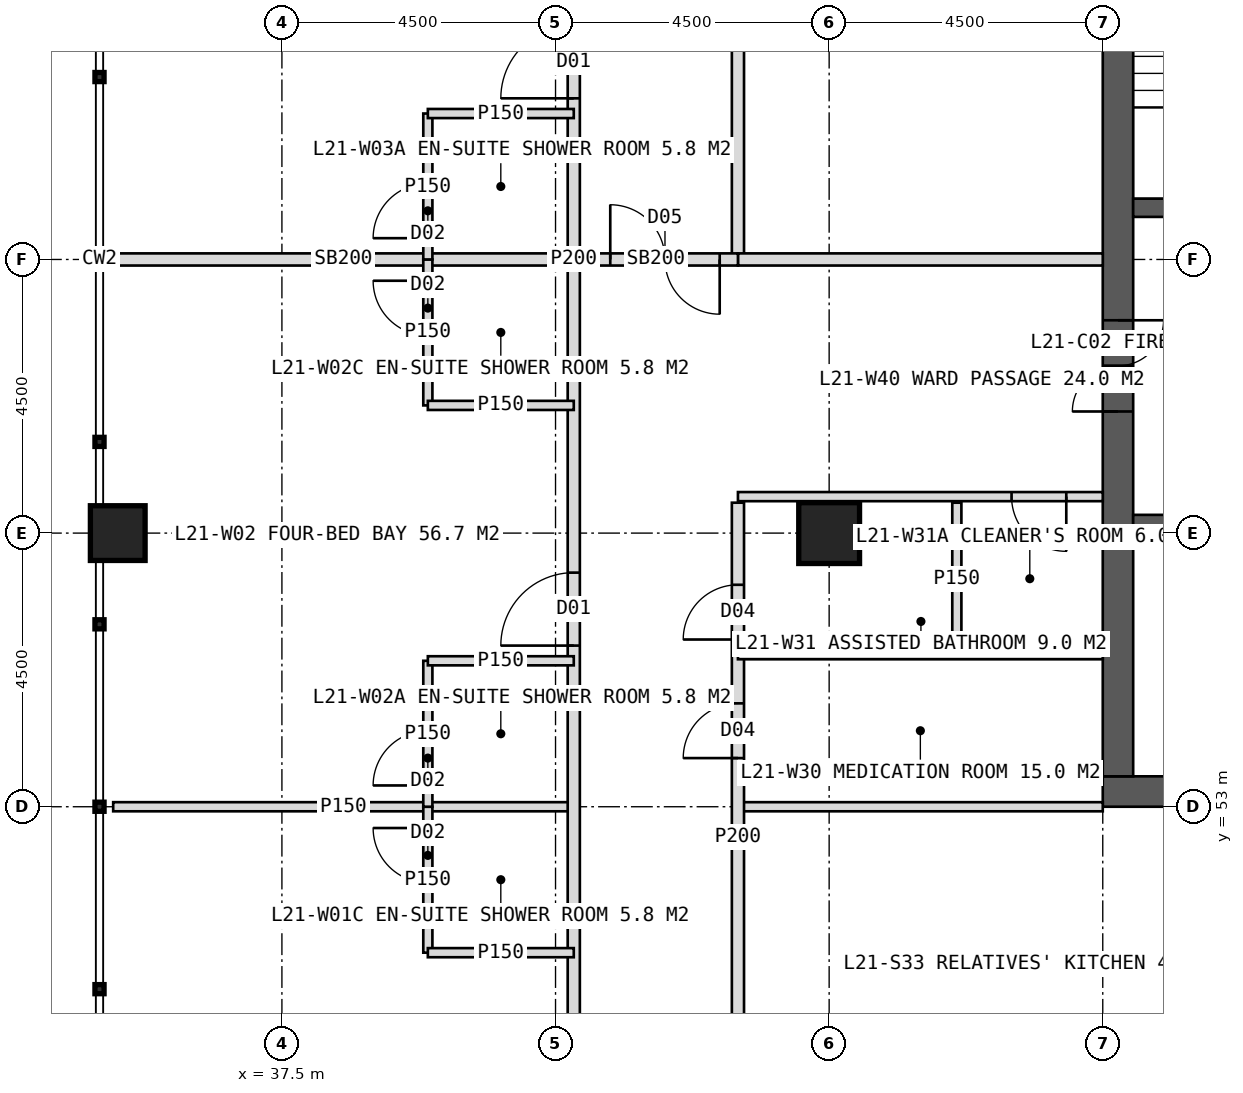
"""IFC4 building model, lengths in metres.
Left out: names, types, materials, properties, quantities, classifications, styles, units other than length and angle.
Written with IfcOpenShell. Run it as: python <this file> out.ifc"""

import sys

from ifc_helpers import new_model, si_unit, direction, frame, frame_2d, origin, origin_2d, place, context, subcontext, project, spatial, rectangle, hollow_rectangle, extrude, element, fill, save


model = new_model("IFC4")
c1 = context("Model", 3, precision=1e-05, world=origin(), true_north=direction((0.0, 1.0)))
c2 = subcontext(c1, "Body", "Model", "MODEL_VIEW")
j1 = project(units=[si_unit("LENGTHUNIT", "METRE"), si_unit("PLANEANGLEUNIT", "RADIAN")], contexts=[c1])
p1 = place(None, origin())
s1 = spatial("IfcSite", under=j1, at=p1, CompositionType="ELEMENT")
p2 = place(p1, origin())
s2 = spatial("IfcBuilding", under=s1, at=p2, CompositionType="ELEMENT")
p3 = place(p2, frame((0.0, 0.0, 91.0)))
s3 = spatial("IfcBuildingStorey", under=s2, at=p3, CompositionType="ELEMENT", Elevation=91.0)
p4 = place(p3, frame((51.0, 53.25, 0.0), z_axis=(0.0, 0.0, 1.0), x_axis=(1.0, 0.0, 0.0)))
e1 = element("IfcWall", 1, at=p4, inside=s3, PredefinedType="SHEAR", context=c2, shape_type="SweptSolid", body=[
    extrude(rectangle(XDim=18.0, YDim=0.5, at=frame_2d((9.0, 0.0))), origin(), (0.0, 0.0, 1.0), 4.0),
])
p5 = place(p4, frame((8.1, 0.0, 0.0)))
e2 = element("IfcOpeningElement", 2, at=p5, cuts=e1, PredefinedType="OPENING", context=c2, shape_type="SweptSolid", body=[
    extrude(rectangle(XDim=1.8, YDim=2.2, at=frame_2d((0.9, 1.1))), frame((0.0, 0.26, 0.0), z_axis=(0.0, -1.0, 0.0), x_axis=(1.0, 0.0, 0.0)), (0.0, 0.0, 1.0), 0.52),
])
p6 = place(p3, frame((51.25, 53.5, 0.0), z_axis=(0.0, 0.0, 1.0), x_axis=(0.0, 1.0, 0.0)))
e3 = element("IfcWall", 3, at=p6, inside=s3, PredefinedType="SHEAR", context=c2, shape_type="SweptSolid", body=[
    extrude(rectangle(XDim=17.0, YDim=0.5, at=frame_2d((8.5, 0.0))), origin(), (0.0, 0.0, 1.0), 4.0),
])
p7 = place(p6, frame((6.0, 0.0, 0.0)))
e4 = element("IfcOpeningElement", 4, at=p7, cuts=e3, PredefinedType="OPENING", context=c2, shape_type="SweptSolid", body=[
    extrude(rectangle(XDim=1.5, YDim=2.2, at=frame_2d((0.75, 1.1))), frame((0.0, 0.26, 0.0), z_axis=(0.0, -1.0, 0.0), x_axis=(1.0, 0.0, 0.0)), (0.0, 0.0, 1.0), 0.52),
])
p8 = place(p3, frame((51.5, 62.85, 0.0), z_axis=(0.0, 0.0, 1.0), x_axis=(1.0, 0.0, 0.0)))
e5 = element("IfcWall", 5, at=p8, inside=s3, PredefinedType="SHEAR", context=c2, shape_type="SweptSolid", body=[
    extrude(rectangle(XDim=3.3, YDim=0.3, at=frame_2d((1.65, 0.0))), origin(), (0.0, 0.0, 1.0), 4.0),
])
p9 = place(p8, frame((1.05, 0.0, 0.0)))
e6 = element("IfcOpeningElement", 6, at=p9, cuts=e5, PredefinedType="OPENING", context=c2, shape_type="SweptSolid", body=[
    extrude(rectangle(XDim=1.2, YDim=2.1, at=frame_2d((0.6, 1.05))), frame((0.0, 0.16, 0.0), z_axis=(0.0, -1.0, 0.0), x_axis=(1.0, 0.0, 0.0)), (0.0, 0.0, 1.0), 0.32),
])
p10 = place(p3, frame((51.5, 57.65, 0.0), z_axis=(0.0, 0.0, 1.0), x_axis=(1.0, 0.0, 0.0)))
e7 = element("IfcWall", 7, at=p10, inside=s3, PredefinedType="SHEAR", context=c2, shape_type="SweptSolid", body=[
    extrude(rectangle(XDim=3.3, YDim=0.3, at=frame_2d((1.65, 0.0))), origin(), (0.0, 0.0, 1.0), 4.0),
])
p11 = place(p10, frame((1.05, 0.0, 0.0)))
e8 = element("IfcOpeningElement", 8, at=p11, cuts=e7, PredefinedType="OPENING", context=c2, shape_type="SweptSolid", body=[
    extrude(rectangle(XDim=1.2, YDim=2.2, at=frame_2d((0.6, 1.1))), frame((0.0, 0.16, 0.0), z_axis=(0.0, -1.0, 0.0), x_axis=(1.0, 0.0, 0.0)), (0.0, 0.0, 1.0), 0.32),
])
p12 = place(p3, frame((46.5, 57.5, 0.0), z_axis=(0.0, 0.0, 1.0), x_axis=(1.0, 0.0, 0.0)))
e9 = element("IfcColumn", 9, at=p12, inside=s3, PredefinedType="COLUMN", context=c2, shape_type="SweptSolid", body=[
    extrude(hollow_rectangle(XDim=1.0, YDim=1.0, WallThickness=0.1, at=origin_2d()), origin(), (0.0, 0.0, 1.0), 4.0),
])
p13 = place(p3, frame((34.8, 57.5, 0.0), z_axis=(0.0, 0.0, 1.0), x_axis=(1.0, 0.0, 0.0)))
e10 = element("IfcColumn", 10, at=p13, inside=s3, PredefinedType="COLUMN", context=c2, shape_type="SweptSolid", body=[
    extrude(hollow_rectangle(XDim=0.9, YDim=0.9, WallThickness=0.08, at=origin_2d()), origin(), (0.0, 0.0, 1.0), 4.0),
])
p14 = place(p3, frame((42.3, 53.0, 0.0), z_axis=(0.0, 0.0, 1.0), x_axis=(-1.0, 0.0, 0.0)))
e11 = element("IfcWall", 11, at=p14, inside=s3, PredefinedType="PARTITIONING", context=c2, shape_type="SweptSolid", body=[
    extrude(rectangle(XDim=7.575, YDim=0.15, at=frame_2d((3.788, 0.0))), origin(), (0.0, 0.0, 1.0), 3.75),
])
p15 = place(p3, frame((42.3, 62.0, 0.0), z_axis=(0.0, 0.0, 1.0), x_axis=(-1.0, 0.0, 0.0)))
e12 = element("IfcWall", 12, at=p15, inside=s3, PredefinedType="SOLIDWALL", context=c2, shape_type="SweptSolid", body=[
    extrude(rectangle(XDim=7.575, YDim=0.2, at=frame_2d((3.788, 0.0))), origin(), (0.0, 0.0, 1.0), 2.75),
])
p16 = place(p3, frame((42.3, 44.3, 0.0), z_axis=(0.0, 0.0, 1.0), x_axis=(0.0, 1.0, 0.0)))
e13 = element("IfcWall", 13, at=p16, inside=s3, PredefinedType="PARTITIONING", context=c2, shape_type="SweptSolid", body=[
    extrude(rectangle(XDim=35.4, YDim=0.2, at=frame_2d((17.7, 0.0))), origin(), (0.0, 0.0, 1.0), 3.75),
])
p17 = place(p16, frame((2.65, 0.0, 0.0)))
e14 = element("IfcOpeningElement", 14, at=p17, cuts=e13, PredefinedType="OPENING", context=c2, shape_type="SweptSolid", body=[
    extrude(rectangle(XDim=1.2, YDim=2.2, at=frame_2d((0.6, 1.1))), frame((0.0, 0.11, 0.0), z_axis=(0.0, -1.0, 0.0), x_axis=(1.0, 0.0, 0.0)), (0.0, 0.0, 1.0), 0.22),
])
p18 = place(p16, frame((11.35, 0.0, 0.0)))
e15 = element("IfcOpeningElement", 15, at=p18, cuts=e13, PredefinedType="OPENING", context=c2, shape_type="SweptSolid", body=[
    extrude(rectangle(XDim=1.2, YDim=2.2, at=frame_2d((0.6, 1.1))), frame((0.0, 0.11, 0.0), z_axis=(0.0, -1.0, 0.0), x_axis=(1.0, 0.0, 0.0)), (0.0, 0.0, 1.0), 0.22),
])
p19 = place(p16, frame((20.35, 0.0, 0.0)))
e16 = element("IfcOpeningElement", 16, at=p19, cuts=e13, PredefinedType="OPENING", context=c2, shape_type="SweptSolid", body=[
    extrude(rectangle(XDim=1.2, YDim=2.2, at=frame_2d((0.6, 1.1))), frame((0.0, 0.11, 0.0), z_axis=(0.0, -1.0, 0.0), x_axis=(1.0, 0.0, 0.0)), (0.0, 0.0, 1.0), 0.22),
])
p20 = place(p16, frame((26.35, 0.0, 0.0)))
e17 = element("IfcOpeningElement", 17, at=p20, cuts=e13, PredefinedType="OPENING", context=c2, shape_type="SweptSolid", body=[
    extrude(rectangle(XDim=1.2, YDim=2.2, at=frame_2d((0.6, 1.1))), frame((0.0, 0.11, 0.0), z_axis=(0.0, -1.0, 0.0), x_axis=(1.0, 0.0, 0.0)), (0.0, 0.0, 1.0), 0.22),
])
p21 = place(p16, frame((30.85, 0.0, 0.0)))
e18 = element("IfcOpeningElement", 18, at=p21, cuts=e13, PredefinedType="OPENING", context=c2, shape_type="SweptSolid", body=[
    extrude(rectangle(XDim=1.2, YDim=2.2, at=frame_2d((0.6, 1.1))), frame((0.0, 0.11, 0.0), z_axis=(0.0, -1.0, 0.0), x_axis=(1.0, 0.0, 0.0)), (0.0, 0.0, 1.0), 0.22),
])
p22 = place(p3, frame((39.9, 50.6, 0.0), z_axis=(0.0, 0.0, 1.0), x_axis=(0.0, 1.0, 0.0)))
e19 = element("IfcWall", 19, at=p22, inside=s3, PredefinedType="PARTITIONING", context=c2, shape_type="SweptSolid", body=[
    extrude(rectangle(XDim=2.4, YDim=0.15, at=frame_2d((1.2, 0.0))), origin(), (0.0, 0.0, 1.0), 3.75),
])
p23 = place(p22, frame((1.15, 0.0, 0.0)))
e20 = element("IfcOpeningElement", 20, at=p23, cuts=e19, PredefinedType="OPENING", context=c2, shape_type="SweptSolid", body=[
    extrude(rectangle(XDim=0.9, YDim=2.1, at=frame_2d((0.45, 1.05))), frame((0.0, 0.085, 0.0), z_axis=(0.0, -1.0, 0.0), x_axis=(1.0, 0.0, 0.0)), (0.0, 0.0, 1.0), 0.17),
])
p24 = place(p3, frame((42.3, 50.6, 0.0), z_axis=(0.0, 0.0, 1.0), x_axis=(-1.0, 0.0, 0.0)))
e21 = element("IfcWall", 21, at=p24, inside=s3, PredefinedType="PARTITIONING", context=c2, shape_type="SweptSolid", body=[
    extrude(rectangle(XDim=2.4, YDim=0.15, at=frame_2d((1.2, 0.0))), origin(), (0.0, 0.0, 1.0), 3.75),
])
p25 = place(p3, frame((39.9, 53.0, 0.0), z_axis=(0.0, 0.0, 1.0), x_axis=(0.0, 1.0, 0.0)))
e22 = element("IfcWall", 22, at=p25, inside=s3, PredefinedType="PARTITIONING", context=c2, shape_type="SweptSolid", body=[
    extrude(rectangle(XDim=2.4, YDim=0.15, at=frame_2d((1.2, 0.0))), origin(), (0.0, 0.0, 1.0), 3.75),
])
p26 = place(p25, frame((0.35, 0.0, 0.0)))
e23 = element("IfcOpeningElement", 23, at=p26, cuts=e22, PredefinedType="OPENING", context=c2, shape_type="SweptSolid", body=[
    extrude(rectangle(XDim=0.9, YDim=2.1, at=frame_2d((0.45, 1.05))), frame((0.0, 0.085, 0.0), z_axis=(0.0, -1.0, 0.0), x_axis=(1.0, 0.0, 0.0)), (0.0, 0.0, 1.0), 0.17),
])
p27 = place(p3, frame((42.3, 55.4, 0.0), z_axis=(0.0, 0.0, 1.0), x_axis=(-1.0, 0.0, 0.0)))
e24 = element("IfcWall", 24, at=p27, inside=s3, PredefinedType="PARTITIONING", context=c2, shape_type="SweptSolid", body=[
    extrude(rectangle(XDim=2.4, YDim=0.15, at=frame_2d((1.2, 0.0))), origin(), (0.0, 0.0, 1.0), 3.75),
])
p28 = place(p3, frame((39.9, 59.6, 0.0), z_axis=(0.0, 0.0, 1.0), x_axis=(0.0, 1.0, 0.0)))
e25 = element("IfcWall", 25, at=p28, inside=s3, PredefinedType="PARTITIONING", context=c2, shape_type="SweptSolid", body=[
    extrude(rectangle(XDim=2.4, YDim=0.15, at=frame_2d((1.2, 0.0))), origin(), (0.0, 0.0, 1.0), 3.75),
])
p29 = place(p28, frame((1.15, 0.0, 0.0)))
e26 = element("IfcOpeningElement", 26, at=p29, cuts=e25, PredefinedType="OPENING", context=c2, shape_type="SweptSolid", body=[
    extrude(rectangle(XDim=0.9, YDim=2.1, at=frame_2d((0.45, 1.05))), frame((0.0, 0.085, 0.0), z_axis=(0.0, -1.0, 0.0), x_axis=(1.0, 0.0, 0.0)), (0.0, 0.0, 1.0), 0.17),
])
p30 = place(p3, frame((42.3, 59.6, 0.0), z_axis=(0.0, 0.0, 1.0), x_axis=(-1.0, 0.0, 0.0)))
e27 = element("IfcWall", 27, at=p30, inside=s3, PredefinedType="PARTITIONING", context=c2, shape_type="SweptSolid", body=[
    extrude(rectangle(XDim=2.4, YDim=0.15, at=frame_2d((1.2, 0.0))), origin(), (0.0, 0.0, 1.0), 3.75),
])
p31 = place(p3, frame((39.9, 62.0, 0.0), z_axis=(0.0, 0.0, 1.0), x_axis=(0.0, 1.0, 0.0)))
e28 = element("IfcWall", 28, at=p31, inside=s3, PredefinedType="PARTITIONING", context=c2, shape_type="SweptSolid", body=[
    extrude(rectangle(XDim=2.4, YDim=0.15, at=frame_2d((1.2, 0.0))), origin(), (0.0, 0.0, 1.0), 3.75),
])
p32 = place(p31, frame((0.35, 0.0, 0.0)))
e29 = element("IfcOpeningElement", 29, at=p32, cuts=e28, PredefinedType="OPENING", context=c2, shape_type="SweptSolid", body=[
    extrude(rectangle(XDim=0.9, YDim=2.1, at=frame_2d((0.45, 1.05))), frame((0.0, 0.085, 0.0), z_axis=(0.0, -1.0, 0.0), x_axis=(1.0, 0.0, 0.0)), (0.0, 0.0, 1.0), 0.17),
])
p33 = place(p3, frame((42.3, 64.4, 0.0), z_axis=(0.0, 0.0, 1.0), x_axis=(-1.0, 0.0, 0.0)))
e30 = element("IfcWall", 30, at=p33, inside=s3, PredefinedType="PARTITIONING", context=c2, shape_type="SweptSolid", body=[
    extrude(rectangle(XDim=2.4, YDim=0.15, at=frame_2d((1.2, 0.0))), origin(), (0.0, 0.0, 1.0), 3.75),
])
p34 = place(p3, frame((51.0, 53.0, 0.0), z_axis=(0.0, 0.0, 1.0), x_axis=(-1.0, 0.0, 0.0)))
e31 = element("IfcWall", 31, at=p34, inside=s3, PredefinedType="PARTITIONING", context=c2, shape_type="SweptSolid", body=[
    extrude(rectangle(XDim=6.0, YDim=0.15, at=frame_2d((3.0, 0.0))), origin(), (0.0, 0.0, 1.0), 3.75),
])
p35 = place(p3, frame((45.0, 47.0, 0.0), z_axis=(0.0, 0.0, 1.0), x_axis=(0.0, 1.0, 0.0)))
e32 = element("IfcWall", 32, at=p35, inside=s3, PredefinedType="PARTITIONING", context=c2, shape_type="SweptSolid", body=[
    extrude(rectangle(XDim=11.0, YDim=0.2, at=frame_2d((5.5, 0.0))), origin(), (0.0, 0.0, 1.0), 3.75),
])
p36 = place(p35, frame((6.8, 0.0, 0.0)))
e33 = element("IfcOpeningElement", 33, at=p36, cuts=e32, PredefinedType="OPENING", context=c2, shape_type="SweptSolid", body=[
    extrude(rectangle(XDim=0.9, YDim=2.1, at=frame_2d((0.45, 1.05))), frame((0.0, 0.11, 0.0), z_axis=(0.0, -1.0, 0.0), x_axis=(1.0, 0.0, 0.0)), (0.0, 0.0, 1.0), 0.22),
])
p37 = place(p35, frame((8.75, 0.0, 0.0)))
e34 = element("IfcOpeningElement", 34, at=p37, cuts=e32, PredefinedType="OPENING", context=c2, shape_type="SweptSolid", body=[
    extrude(rectangle(XDim=0.9, YDim=2.1, at=frame_2d((0.45, 1.05))), frame((0.0, 0.11, 0.0), z_axis=(0.0, -1.0, 0.0), x_axis=(1.0, 0.0, 0.0)), (0.0, 0.0, 1.0), 0.22),
])
p38 = place(p3, frame((45.0, 62.0, 0.0), z_axis=(0.0, 0.0, 1.0), x_axis=(0.0, 1.0, 0.0)))
e35 = element("IfcWall", 35, at=p38, inside=s3, PredefinedType="PARTITIONING", context=c2, shape_type="SweptSolid", body=[
    extrude(rectangle(XDim=15.0, YDim=0.2, at=frame_2d((7.5, 0.0))), origin(), (0.0, 0.0, 1.0), 3.75),
])
p39 = place(p38, frame((7.3, 0.0, 0.0)))
e36 = element("IfcOpeningElement", 36, at=p39, cuts=e35, PredefinedType="OPENING", context=c2, shape_type="SweptSolid", body=[
    extrude(rectangle(XDim=1.0, YDim=2.1, at=frame_2d((0.5, 1.05))), frame((0.0, 0.11, 0.0), z_axis=(0.0, -1.0, 0.0), x_axis=(1.0, 0.0, 0.0)), (0.0, 0.0, 1.0), 0.22),
])
p40 = place(p38, frame((11.2, 0.0, 0.0)))
e37 = element("IfcOpeningElement", 37, at=p40, cuts=e35, PredefinedType="OPENING", context=c2, shape_type="SweptSolid", body=[
    extrude(rectangle(XDim=1.0, YDim=2.1, at=frame_2d((0.5, 1.05))), frame((0.0, 0.11, 0.0), z_axis=(0.0, -1.0, 0.0), x_axis=(1.0, 0.0, 0.0)), (0.0, 0.0, 1.0), 0.22),
])
p41 = place(p3, frame((51.0, 58.1, 0.0), z_axis=(0.0, 0.0, 1.0), x_axis=(-1.0, 0.0, 0.0)))
e38 = element("IfcWall", 38, at=p41, inside=s3, PredefinedType="PARTITIONING", context=c2, shape_type="SweptSolid", body=[
    extrude(rectangle(XDim=6.0, YDim=0.15, at=frame_2d((3.0, 0.0))), origin(), (0.0, 0.0, 1.0), 3.75),
])
p42 = place(p41, frame((0.6, 0.0, 0.0)))
e39 = element("IfcOpeningElement", 39, at=p42, cuts=e38, PredefinedType="OPENING", context=c2, shape_type="SweptSolid", body=[
    extrude(rectangle(XDim=0.9, YDim=2.1, at=frame_2d((0.45, 1.05))), frame((0.0, 0.085, 0.0), z_axis=(0.0, -1.0, 0.0), x_axis=(1.0, 0.0, 0.0)), (0.0, 0.0, 1.0), 0.17),
])
p43 = place(p3, frame((51.0, 62.0, 0.0), z_axis=(0.0, 0.0, 1.0), x_axis=(-1.0, 0.0, 0.0)))
e40 = element("IfcWall", 40, at=p43, inside=s3, PredefinedType="SOLIDWALL", context=c2, shape_type="SweptSolid", body=[
    extrude(rectangle(XDim=6.0, YDim=0.2, at=frame_2d((3.0, 0.0))), origin(), (0.0, 0.0, 1.0), 2.75),
])
p44 = place(p3, frame((51.0, 55.5, 0.0), z_axis=(0.0, 0.0, 1.0), x_axis=(-1.0, 0.0, 0.0)))
e41 = element("IfcWall", 41, at=p44, inside=s3, PredefinedType="PARTITIONING", context=c2, shape_type="SweptSolid", body=[
    extrude(rectangle(XDim=6.0, YDim=0.15, at=frame_2d((3.0, 0.0))), origin(), (0.0, 0.0, 1.0), 3.75),
])
p45 = place(p3, frame((48.6, 55.5, 0.0), z_axis=(0.0, 0.0, 1.0), x_axis=(0.0, 1.0, 0.0)))
e42 = element("IfcWall", 42, at=p45, inside=s3, PredefinedType="PARTITIONING", context=c2, shape_type="SweptSolid", body=[
    extrude(rectangle(XDim=2.5, YDim=0.15, at=frame_2d((1.25, 0.0))), origin(), (0.0, 0.0, 1.0), 3.75),
])
p46 = place(p3, frame((45.0, 62.0, 0.0), z_axis=(0.0, 0.0, 1.0), x_axis=(-1.0, 0.0, 0.0)))
e43 = element("IfcWall", 43, at=p46, inside=s3, PredefinedType="SOLIDWALL", context=c2, shape_type="SweptSolid", body=[
    extrude(rectangle(XDim=2.7, YDim=0.2, at=frame_2d((1.35, 0.0))), origin(), (0.0, 0.0, 1.0), 2.75),
])
p47 = place(p46, frame((0.3, 0.0, 0.0)))
e44 = element("IfcOpeningElement", 44, at=p47, cuts=e43, PredefinedType="OPENING", context=c2, shape_type="SweptSolid", body=[
    extrude(rectangle(XDim=1.8, YDim=2.2, at=frame_2d((0.9, 1.1))), frame((0.0, 0.11, 0.0), z_axis=(0.0, -1.0, 0.0), x_axis=(1.0, 0.0, 0.0)), (0.0, 0.0, 1.0), 0.22),
])
p48 = place(p23, origin())
e45 = element("IfcDoor", 45, at=p48, inside=s3, OperationType="SINGLE_SWING_RIGHT", PredefinedType="DOOR", context=c2, shape_type="SweptSolid", body=[
    extrude(rectangle(XDim=0.9, YDim=2.1, at=frame_2d((0.45, 1.05))), frame((0.0, 0.025, 0.0), z_axis=(0.0, -1.0, 0.0), x_axis=(1.0, 0.0, 0.0)), (0.0, 0.0, 1.0), 0.05),
])
fill(e20, e45)
p49 = place(p18, origin())
e46 = element("IfcDoor", 46, at=p49, inside=s3, OperationType="SINGLE_SWING_LEFT", PredefinedType="DOOR", context=c2, shape_type="SweptSolid", body=[
    extrude(rectangle(XDim=1.2, YDim=2.2, at=frame_2d((0.6, 1.1))), frame((0.0, 0.025, 0.0), z_axis=(0.0, -1.0, 0.0), x_axis=(1.0, 0.0, 0.0)), (0.0, 0.0, 1.0), 0.05),
])
fill(e15, e46)
p50 = place(p26, origin())
e47 = element("IfcDoor", 47, at=p50, inside=s3, OperationType="SINGLE_SWING_LEFT", PredefinedType="DOOR", context=c2, shape_type="SweptSolid", body=[
    extrude(rectangle(XDim=0.9, YDim=2.1, at=frame_2d((0.45, 1.05))), frame((0.0, 0.025, 0.0), z_axis=(0.0, -1.0, 0.0), x_axis=(1.0, 0.0, 0.0)), (0.0, 0.0, 1.0), 0.05),
])
fill(e23, e47)
p51 = place(p29, origin())
e48 = element("IfcDoor", 48, at=p51, inside=s3, OperationType="SINGLE_SWING_RIGHT", PredefinedType="DOOR", context=c2, shape_type="SweptSolid", body=[
    extrude(rectangle(XDim=0.9, YDim=2.1, at=frame_2d((0.45, 1.05))), frame((0.0, 0.025, 0.0), z_axis=(0.0, -1.0, 0.0), x_axis=(1.0, 0.0, 0.0)), (0.0, 0.0, 1.0), 0.05),
])
fill(e26, e48)
p52 = place(p19, origin())
e49 = element("IfcDoor", 49, at=p52, inside=s3, OperationType="SINGLE_SWING_LEFT", PredefinedType="DOOR", context=c2, shape_type="SweptSolid", body=[
    extrude(rectangle(XDim=1.2, YDim=2.2, at=frame_2d((0.6, 1.1))), frame((0.0, 0.025, 0.0), z_axis=(0.0, -1.0, 0.0), x_axis=(1.0, 0.0, 0.0)), (0.0, 0.0, 1.0), 0.05),
])
fill(e16, e49)
p53 = place(p32, origin())
e50 = element("IfcDoor", 50, at=p53, inside=s3, OperationType="SINGLE_SWING_LEFT", PredefinedType="DOOR", context=c2, shape_type="SweptSolid", body=[
    extrude(rectangle(XDim=0.9, YDim=2.1, at=frame_2d((0.45, 1.05))), frame((0.0, 0.025, 0.0), z_axis=(0.0, -1.0, 0.0), x_axis=(1.0, 0.0, 0.0)), (0.0, 0.0, 1.0), 0.05),
])
fill(e29, e50)
p54 = place(p36, origin())
e51 = element("IfcDoor", 51, at=p54, inside=s3, OperationType="SINGLE_SWING_LEFT", PredefinedType="DOOR", context=c2, shape_type="SweptSolid", body=[
    extrude(rectangle(XDim=0.9, YDim=2.1, at=frame_2d((0.45, 1.05))), frame((0.0, 0.025, 0.0), z_axis=(0.0, -1.0, 0.0), x_axis=(1.0, 0.0, 0.0)), (0.0, 0.0, 1.0), 0.05),
])
fill(e33, e51)
p55 = place(p42, origin())
e52 = element("IfcDoor", 52, at=p55, inside=s3, OperationType="SINGLE_SWING_LEFT", PredefinedType="DOOR", context=c2, shape_type="SweptSolid", body=[
    extrude(rectangle(XDim=0.9, YDim=2.1, at=frame_2d((0.45, 1.05))), frame((0.0, 0.025, 0.0), z_axis=(0.0, -1.0, 0.0), x_axis=(1.0, 0.0, 0.0)), (0.0, 0.0, 1.0), 0.05),
])
fill(e39, e52)
p56 = place(p37, origin())
e53 = element("IfcDoor", 53, at=p56, inside=s3, OperationType="SINGLE_SWING_LEFT", PredefinedType="DOOR", context=c2, shape_type="SweptSolid", body=[
    extrude(rectangle(XDim=0.9, YDim=2.1, at=frame_2d((0.45, 1.05))), frame((0.0, 0.025, 0.0), z_axis=(0.0, -1.0, 0.0), x_axis=(1.0, 0.0, 0.0)), (0.0, 0.0, 1.0), 0.05),
])
fill(e34, e53)
p57 = place(p47, origin())
e54 = element("IfcDoor", 54, at=p57, inside=s3, OperationType="DOUBLE_DOOR_DOUBLE_SWING", PredefinedType="DOOR", context=c2, shape_type="SweptSolid", body=[
    extrude(rectangle(XDim=1.8, YDim=2.2, at=frame_2d((0.9, 1.1))), frame((0.0, 0.025, 0.0), z_axis=(0.0, -1.0, 0.0), x_axis=(1.0, 0.0, 0.0)), (0.0, 0.0, 1.0), 0.05),
])
fill(e44, e54)
p58 = place(p7, origin())
e55 = element("IfcDoor", 55, at=p58, inside=s3, OperationType="DOUBLE_DOOR_SINGLE_SWING", PredefinedType="DOOR", context=c2, shape_type="SweptSolid", body=[
    extrude(rectangle(XDim=1.5, YDim=2.2, at=frame_2d((0.75, 1.1))), frame((0.0, 0.025, 0.0), z_axis=(0.0, -1.0, 0.0), x_axis=(1.0, 0.0, 0.0)), (0.0, 0.0, 1.0), 0.05),
])
fill(e4, e55)
save(model, sys.argv[1])
